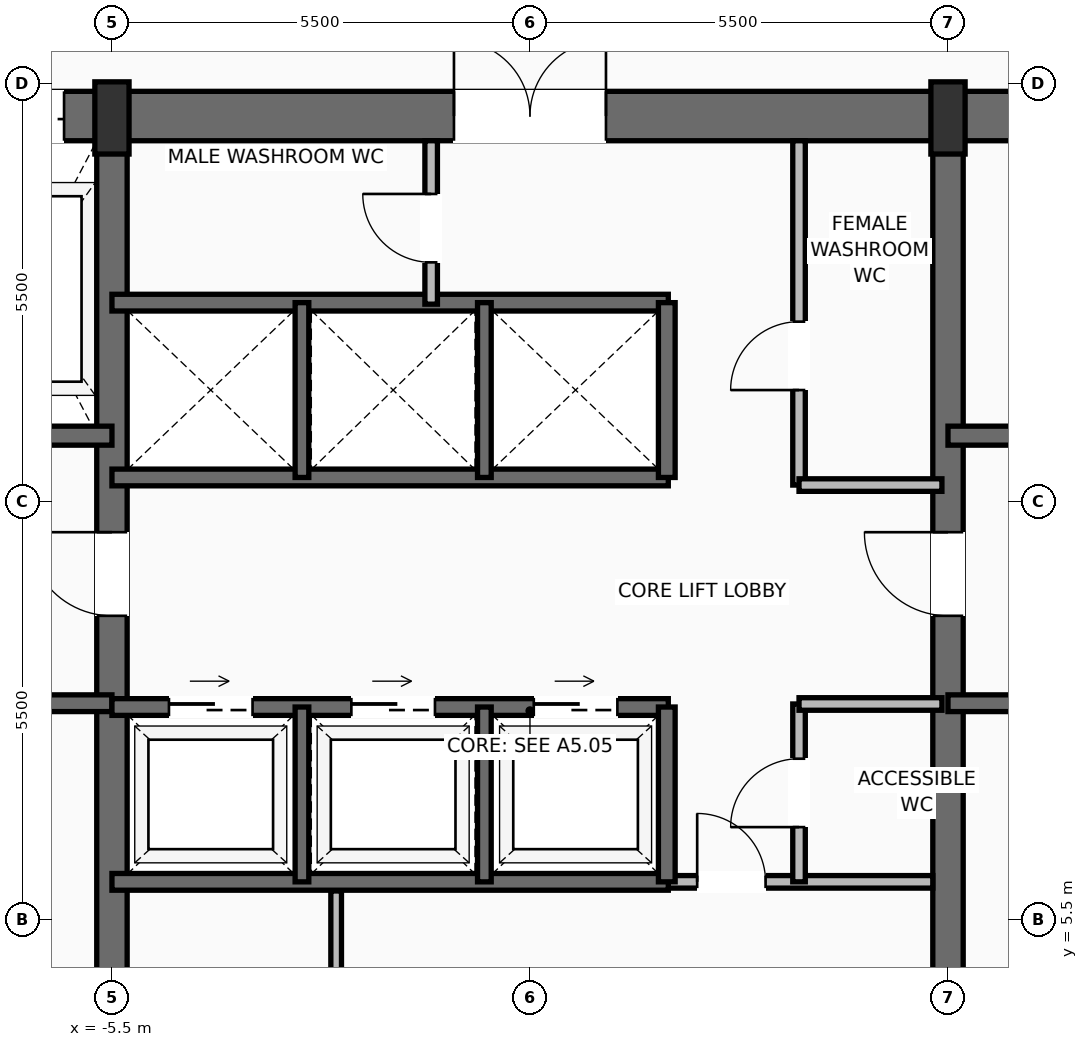
"""IFC4 building model, lengths in metres.
Left out: names, types, materials, properties, quantities, classifications, styles, units other than length and angle.
Written with IfcOpenShell. Run it as: python <this file> out.ifc"""

import sys

from ifc_helpers import new_model, si_unit, direction, frame, frame_2d, origin, origin_2d, place, context, subcontext, project, spatial, rectangle, extrude, source, transform, mapped, element, fill, save


model = new_model("IFC4")
c1 = context("Model", 3, precision=1e-05, world=origin(), true_north=direction((0.0, 1.0)))
c2 = subcontext(c1, "Body", "Model", "MODEL_VIEW")
j1 = project(units=[si_unit("LENGTHUNIT", "METRE"), si_unit("PLANEANGLEUNIT", "RADIAN")], contexts=[c1])
p1 = place(None, origin())
s1 = spatial("IfcSite", under=j1, at=p1, CompositionType="ELEMENT")
p2 = place(p1, origin())
s2 = spatial("IfcBuilding", under=s1, at=p2, CompositionType="ELEMENT")
p3 = place(p2, frame((0.0, 0.0, 144.1)))
s3 = spatial("IfcBuildingStorey", under=s2, at=p3, CompositionType="ELEMENT", Elevation=144.1)
p4 = place(p3, frame((-10.8, 16.075, 0.0), z_axis=(0.0, 0.0, 1.0), x_axis=(1.0, 0.0, 0.0)))
e1 = element("IfcWall", 1, at=p4, inside=s3, PredefinedType="SHEAR", context=c2, shape_type="SweptSolid", body=[
    extrude(rectangle(XDim=21.6, YDim=0.65, at=frame_2d((10.8, 0.0))), origin(), (0.0, 0.0, 1.0), 3.47),
])
p5 = place(p4, frame((3.37, 0.0, 0.0)))
e2 = element("IfcOpeningElement", 2, at=p5, cuts=e1, PredefinedType="OPENING", context=c2, shape_type="SweptSolid", body=[
    extrude(rectangle(XDim=1.3, YDim=2.3, at=frame_2d((0.65, 1.15))), frame((0.0, 0.335, 0.0), z_axis=(0.0, -1.0, 0.0), x_axis=(1.0, 0.0, 0.0)), (0.0, 0.0, 1.0), 0.67),
])
p6 = place(p4, frame((9.8, 0.0, 0.0)))
e3 = element("IfcOpeningElement", 3, at=p6, cuts=e1, PredefinedType="OPENING", context=c2, shape_type="SweptSolid", body=[
    extrude(rectangle(XDim=2.0, YDim=2.4, at=frame_2d((1.0, 1.2))), frame((0.0, 0.335, 0.0), z_axis=(0.0, -1.0, 0.0), x_axis=(1.0, 0.0, 0.0)), (0.0, 0.0, 1.0), 0.67),
])
p7 = place(p3, frame((-5.5, 0.525, 0.0), z_axis=(0.0, 0.0, 1.0), x_axis=(0.0, 1.0, 0.0)))
e4 = element("IfcWall", 4, at=p7, inside=s3, PredefinedType="SHEAR", context=c2, shape_type="SweptSolid", body=[
    extrude(rectangle(XDim=15.55, YDim=0.4, at=frame_2d((7.775, 0.0))), origin(), (0.0, 0.0, 1.0), 3.47),
])
p8 = place(p7, frame((8.975, 0.0, 0.0)))
e5 = element("IfcOpeningElement", 5, at=p8, cuts=e4, PredefinedType="OPENING", context=c2, shape_type="SweptSolid", body=[
    extrude(rectangle(XDim=1.1, YDim=2.2, at=frame_2d((0.55, 1.1))), frame((0.0, 0.21, 0.0), z_axis=(0.0, -1.0, 0.0), x_axis=(1.0, 0.0, 0.0)), (0.0, 0.0, 1.0), 0.42),
])
p9 = place(p3, frame((5.5, 0.525, 0.0), z_axis=(0.0, 0.0, 1.0), x_axis=(0.0, 1.0, 0.0)))
e6 = element("IfcWall", 6, at=p9, inside=s3, PredefinedType="SHEAR", context=c2, shape_type="SweptSolid", body=[
    extrude(rectangle(XDim=15.55, YDim=0.4, at=frame_2d((7.775, 0.0))), origin(), (0.0, 0.0, 1.0), 3.47),
])
p10 = place(p9, frame((8.975, 0.0, 0.0)))
e7 = element("IfcOpeningElement", 7, at=p10, cuts=e6, PredefinedType="OPENING", context=c2, shape_type="SweptSolid", body=[
    extrude(rectangle(XDim=1.1, YDim=2.2, at=frame_2d((0.55, 1.1))), frame((0.0, 0.21, 0.0), z_axis=(0.0, -1.0, 0.0), x_axis=(1.0, 0.0, 0.0)), (0.0, 0.0, 1.0), 0.42),
])
m1 = source(origin(), c2, "Body", "SweptSolid", [
    extrude(rectangle(XDim=0.45, YDim=0.95, at=origin_2d()), origin(), (0.0, 0.0, 1.0), 3.7),
])
for number, where, z_axis, x_axis in (
    (8, (-5.5, 16.05, 0.0), (0.0, 0.0, 1.0), (1.0, 0.0, 0.0)),
    (9, (5.5, 16.05, 0.0), (0.0, 0.0, 1.0), (1.0, 0.0, 0.0)),
):
    element("IfcColumn", number, at=place(p3, frame(where, z_axis=z_axis, x_axis=x_axis)), inside=s3, PredefinedType="PILASTER", context=c2, shape_type="MappedRepresentation", body=[
        mapped(m1, transform((0.0, 0.0, 0.0), scale=1.0)),
    ])
p11 = place(p3, frame((-5.5, 8.35, 0.0), z_axis=(0.0, 0.0, 1.0), x_axis=(-1.0, 0.0, 0.0)))
e10 = element("IfcWall", 10, at=p11, inside=s3, PredefinedType="SOLIDWALL", context=c2, shape_type="SweptSolid", body=[
    extrude(rectangle(XDim=4.65, YDim=0.22, at=frame_2d((2.325, 0.0))), origin(), (0.0, 0.0, 1.0), 3.47),
])
p12 = place(p11, frame((2.5, 0.0, 0.0)))
e11 = element("IfcOpeningElement", 11, at=p12, cuts=e10, PredefinedType="OPENING", context=c2, shape_type="SweptSolid", body=[
    extrude(rectangle(XDim=1.15, YDim=2.2, at=frame_2d((0.575, 1.1))), frame((0.0, 0.12, 0.0), z_axis=(0.0, -1.0, 0.0), x_axis=(1.0, 0.0, 0.0)), (0.0, 0.0, 1.0), 0.24),
])
p13 = place(p3, frame((-5.5, 11.87, 0.0), z_axis=(0.0, 0.0, 1.0), x_axis=(-1.0, 0.0, 0.0)))
e12 = element("IfcWall", 12, at=p13, inside=s3, PredefinedType="SOLIDWALL", context=c2, shape_type="SweptSolid", body=[
    extrude(rectangle(XDim=4.65, YDim=0.25, at=frame_2d((2.325, 0.0))), origin(), (0.0, 0.0, 1.0), 3.47),
])
p14 = place(p13, frame((2.95, 0.0, 0.0)))
e13 = element("IfcOpeningElement", 13, at=p14, cuts=e12, PredefinedType="OPENING", context=c2, shape_type="SweptSolid", body=[
    extrude(rectangle(XDim=1.2, YDim=2.25, at=frame_2d((0.6, 1.125))), frame((0.0, 0.135, 0.0), z_axis=(0.0, -1.0, 0.0), x_axis=(1.0, 0.0, 0.0)), (0.0, 0.0, 1.0), 0.27),
])
p15 = place(p3, frame((10.15, 8.35, 0.0), z_axis=(0.0, 0.0, 1.0), x_axis=(-1.0, 0.0, 0.0)))
e14 = element("IfcWall", 14, at=p15, inside=s3, PredefinedType="SOLIDWALL", context=c2, shape_type="SweptSolid", body=[
    extrude(rectangle(XDim=4.65, YDim=0.22, at=frame_2d((2.325, 0.0))), origin(), (0.0, 0.0, 1.0), 3.47),
])
p16 = place(p15, frame((1.0, 0.0, 0.0)))
e15 = element("IfcOpeningElement", 15, at=p16, cuts=e14, PredefinedType="OPENING", context=c2, shape_type="SweptSolid", body=[
    extrude(rectangle(XDim=1.15, YDim=2.2, at=frame_2d((0.575, 1.1))), frame((0.0, 0.12, 0.0), z_axis=(0.0, -1.0, 0.0), x_axis=(1.0, 0.0, 0.0)), (0.0, 0.0, 1.0), 0.24),
])
p17 = place(p3, frame((10.15, 11.87, 0.0), z_axis=(0.0, 0.0, 1.0), x_axis=(-1.0, 0.0, 0.0)))
e16 = element("IfcWall", 16, at=p17, inside=s3, PredefinedType="SOLIDWALL", context=c2, shape_type="SweptSolid", body=[
    extrude(rectangle(XDim=4.65, YDim=0.25, at=frame_2d((2.325, 0.0))), origin(), (0.0, 0.0, 1.0), 3.47),
])
p18 = place(p17, frame((0.5, 0.0, 0.0)))
e17 = element("IfcOpeningElement", 17, at=p18, cuts=e16, PredefinedType="OPENING", context=c2, shape_type="SweptSolid", body=[
    extrude(rectangle(XDim=1.2, YDim=2.25, at=frame_2d((0.6, 1.125))), frame((0.0, 0.135, 0.0), z_axis=(0.0, -1.0, 0.0), x_axis=(1.0, 0.0, 0.0)), (0.0, 0.0, 1.0), 0.27),
])
p19 = place(p3, frame((1.82, 6.0, 0.0), z_axis=(0.0, 0.0, 1.0), x_axis=(1.0, 0.0, 0.0)))
e18 = element("IfcWall", 18, at=p19, inside=s3, PredefinedType="PARTITIONING", context=c2, shape_type="SweptSolid", body=[
    extrude(rectangle(XDim=3.48, YDim=0.165, at=frame_2d((1.74, 0.0))), origin(), (0.0, 0.0, 1.0), 3.462),
])
p20 = place(p19, frame((0.38, 0.0, 0.0)))
e19 = element("IfcOpeningElement", 19, at=p20, cuts=e18, PredefinedType="OPENING", context=c2, shape_type="SweptSolid", body=[
    extrude(rectangle(XDim=0.9, YDim=2.1, at=frame_2d((0.45, 1.05))), frame((0.0, 0.093, 0.0), z_axis=(0.0, -1.0, 0.0), x_axis=(1.0, 0.0, 0.0)), (0.0, 0.0, 1.0), 0.185),
])
p21 = place(p3, frame((-2.55, 0.85, 0.0), z_axis=(0.0, 0.0, 1.0), x_axis=(0.0, 1.0, 0.0)))
e20 = element("IfcWall", 20, at=p21, inside=s3, PredefinedType="PARTITIONING", context=c2, shape_type="SweptSolid", body=[
    extrude(rectangle(XDim=5.03, YDim=0.14, at=frame_2d((2.515, 0.0))), origin(), (0.0, 0.0, 1.0), 3.462),
])
p22 = place(p21, frame((2.1, 0.0, 0.0)))
e21 = element("IfcOpeningElement", 21, at=p22, cuts=e20, PredefinedType="OPENING", context=c2, shape_type="SweptSolid", body=[
    extrude(rectangle(XDim=0.9, YDim=2.1, at=frame_2d((0.45, 1.05))), frame((0.0, 0.08, 0.0), z_axis=(0.0, -1.0, 0.0), x_axis=(1.0, 0.0, 0.0)), (0.0, 0.0, 1.0), 0.16),
])
p23 = place(p3, frame((3.54, 6.0, 0.0), z_axis=(0.0, 0.0, 1.0), x_axis=(0.0, 1.0, 0.0)))
e22 = element("IfcWall", 22, at=p23, inside=s3, PredefinedType="PARTITIONING", context=c2, shape_type="SweptSolid", body=[
    extrude(rectangle(XDim=2.34, YDim=0.165, at=frame_2d((1.17, 0.0))), origin(), (0.0, 0.0, 1.0), 3.462),
])
p24 = place(p23, frame((0.72, 0.0, 0.0)))
e23 = element("IfcOpeningElement", 23, at=p24, cuts=e22, PredefinedType="OPENING", context=c2, shape_type="SweptSolid", body=[
    extrude(rectangle(XDim=0.9, YDim=2.1, at=frame_2d((0.45, 1.05))), frame((0.0, 0.093, 0.0), z_axis=(0.0, -1.0, 0.0), x_axis=(1.0, 0.0, 0.0)), (0.0, 0.0, 1.0), 0.185),
])
p25 = place(p3, frame((3.54, 8.34, 0.0), z_axis=(0.0, 0.0, 1.0), x_axis=(1.0, 0.0, 0.0)))
e24 = element("IfcWall", 24, at=p25, inside=s3, PredefinedType="PARTITIONING", context=c2, shape_type="SweptSolid", body=[
    extrude(rectangle(XDim=1.88, YDim=0.165, at=frame_2d((0.94, 0.0))), origin(), (0.0, 0.0, 1.0), 3.462),
])
p26 = place(p3, frame((-5.5, 6.0, 0.0), z_axis=(0.0, 0.0, 1.0), x_axis=(1.0, 0.0, 0.0)))
e25 = element("IfcWall", 25, at=p26, inside=s3, PredefinedType="SOLIDWALL", context=c2, shape_type="SweptSolid", body=[
    extrude(rectangle(XDim=7.32, YDim=0.22, at=frame_2d((3.66, 0.0))), origin(), (0.0, 0.0, 1.0), 3.47),
])
p27 = place(p3, frame((-5.5, 8.3, 0.0), z_axis=(0.0, 0.0, 1.0), x_axis=(1.0, 0.0, 0.0)))
e26 = element("IfcWall", 26, at=p27, inside=s3, PredefinedType="SOLIDWALL", context=c2, shape_type="SweptSolid", body=[
    extrude(rectangle(XDim=7.32, YDim=0.22, at=frame_2d((3.66, 0.0))), origin(), (0.0, 0.0, 1.0), 3.47),
])
p28 = place(p27, frame((0.75, 0.0, 0.0)))
e27 = element("IfcOpeningElement", 27, at=p28, cuts=e26, PredefinedType="OPENING", context=c2, shape_type="SweptSolid", body=[
    extrude(rectangle(XDim=1.1, YDim=2.2, at=frame_2d((0.55, 1.1))), frame((0.0, 0.12, 0.0), z_axis=(0.0, -1.0, 0.0), x_axis=(1.0, 0.0, 0.0)), (0.0, 0.0, 1.0), 0.24),
])
p29 = place(p27, frame((3.15, 0.0, 0.0)))
e28 = element("IfcOpeningElement", 28, at=p29, cuts=e26, PredefinedType="OPENING", context=c2, shape_type="SweptSolid", body=[
    extrude(rectangle(XDim=1.1, YDim=2.2, at=frame_2d((0.55, 1.1))), frame((0.0, 0.12, 0.0), z_axis=(0.0, -1.0, 0.0), x_axis=(1.0, 0.0, 0.0)), (0.0, 0.0, 1.0), 0.24),
])
p30 = place(p27, frame((5.55, 0.0, 0.0)))
e29 = element("IfcOpeningElement", 29, at=p30, cuts=e26, PredefinedType="OPENING", context=c2, shape_type="SweptSolid", body=[
    extrude(rectangle(XDim=1.1, YDim=2.2, at=frame_2d((0.55, 1.1))), frame((0.0, 0.12, 0.0), z_axis=(0.0, -1.0, 0.0), x_axis=(1.0, 0.0, 0.0)), (0.0, 0.0, 1.0), 0.24),
])
p31 = place(p3, frame((1.8, 6.0, 0.0), z_axis=(0.0, 0.0, 1.0), x_axis=(0.0, 1.0, 0.0)))
e30 = element("IfcWall", 30, at=p31, inside=s3, PredefinedType="SOLIDWALL", context=c2, shape_type="SweptSolid", body=[
    extrude(rectangle(XDim=2.3, YDim=0.22, at=frame_2d((1.15, 0.0))), origin(), (0.0, 0.0, 1.0), 3.47),
])
for number, where, z_axis, x_axis in (
    (31, (-3.0, 6.0, 0.0), (0.0, 0.0, 1.0), (0.0, 1.0, 0.0)),
    (32, (-0.6, 6.0, 0.0), (0.0, 0.0, 1.0), (0.0, 1.0, 0.0)),
):
    element("IfcWall", number, at=place(p3, frame(where, z_axis=z_axis, x_axis=x_axis)), inside=s3, PredefinedType="SOLIDWALL", context=c2, shape_type="SweptSolid", body=[
        extrude(rectangle(XDim=2.3, YDim=0.18, at=frame_2d((1.15, 0.0))), origin(), (0.0, 0.0, 1.0), 3.47),
    ])
for number, where, z_axis, x_axis in (
    (33, (-5.5, 11.32, 0.0), (0.0, 0.0, 1.0), (1.0, 0.0, 0.0)),
    (34, (-5.5, 13.62, 0.0), (0.0, 0.0, 1.0), (1.0, 0.0, 0.0)),
):
    element("IfcWall", number, at=place(p3, frame(where, z_axis=z_axis, x_axis=x_axis)), inside=s3, PredefinedType="SOLIDWALL", context=c2, shape_type="SweptSolid", body=[
        extrude(rectangle(XDim=7.32, YDim=0.22, at=frame_2d((3.66, 0.0))), origin(), (0.0, 0.0, 1.0), 3.47),
    ])
p32 = place(p3, frame((1.8, 11.32, 0.0), z_axis=(0.0, 0.0, 1.0), x_axis=(0.0, 1.0, 0.0)))
e35 = element("IfcWall", 35, at=p32, inside=s3, PredefinedType="SOLIDWALL", context=c2, shape_type="SweptSolid", body=[
    extrude(rectangle(XDim=2.3, YDim=0.22, at=frame_2d((1.15, 0.0))), origin(), (0.0, 0.0, 1.0), 3.47),
])
for number, where, z_axis, x_axis in (
    (36, (-3.0, 11.32, 0.0), (0.0, 0.0, 1.0), (0.0, 1.0, 0.0)),
    (37, (-0.6, 11.32, 0.0), (0.0, 0.0, 1.0), (0.0, 1.0, 0.0)),
):
    element("IfcWall", number, at=place(p3, frame(where, z_axis=z_axis, x_axis=x_axis)), inside=s3, PredefinedType="SOLIDWALL", context=c2, shape_type="SweptSolid", body=[
        extrude(rectangle(XDim=2.3, YDim=0.18, at=frame_2d((1.15, 0.0))), origin(), (0.0, 0.0, 1.0), 3.47),
    ])
p33 = place(p3, frame((-1.3, 13.6, 0.0), z_axis=(0.0, 0.0, 1.0), x_axis=(0.0, 1.0, 0.0)))
e38 = element("IfcWall", 38, at=p33, inside=s3, PredefinedType="PARTITIONING", context=c2, shape_type="SweptSolid", body=[
    extrude(rectangle(XDim=2.15, YDim=0.165, at=frame_2d((1.075, 0.0))), origin(), (0.0, 0.0, 1.0), 3.462),
])
p34 = place(p33, frame((0.55, 0.0, 0.0)))
e39 = element("IfcOpeningElement", 39, at=p34, cuts=e38, PredefinedType="OPENING", context=c2, shape_type="SweptSolid", body=[
    extrude(rectangle(XDim=0.9, YDim=2.1, at=frame_2d((0.45, 1.05))), frame((0.0, 0.093, 0.0), z_axis=(0.0, -1.0, 0.0), x_axis=(1.0, 0.0, 0.0)), (0.0, 0.0, 1.0), 0.185),
])
p35 = place(p3, frame((3.54, 11.22, 0.0), z_axis=(0.0, 0.0, 1.0), x_axis=(0.0, 1.0, 0.0)))
e40 = element("IfcWall", 40, at=p35, inside=s3, PredefinedType="PARTITIONING", context=c2, shape_type="SweptSolid", body=[
    extrude(rectangle(XDim=4.53, YDim=0.165, at=frame_2d((2.265, 0.0))), origin(), (0.0, 0.0, 1.0), 3.462),
])
p36 = place(p35, frame((1.25, 0.0, 0.0)))
e41 = element("IfcOpeningElement", 41, at=p36, cuts=e40, PredefinedType="OPENING", context=c2, shape_type="SweptSolid", body=[
    extrude(rectangle(XDim=0.9, YDim=2.1, at=frame_2d((0.45, 1.05))), frame((0.0, 0.093, 0.0), z_axis=(0.0, -1.0, 0.0), x_axis=(1.0, 0.0, 0.0)), (0.0, 0.0, 1.0), 0.185),
])
p37 = place(p3, frame((3.54, 11.22, 0.0), z_axis=(0.0, 0.0, 1.0), x_axis=(1.0, 0.0, 0.0)))
e42 = element("IfcWall", 42, at=p37, inside=s3, PredefinedType="PARTITIONING", context=c2, shape_type="SweptSolid", body=[
    extrude(rectangle(XDim=1.88, YDim=0.165, at=frame_2d((0.94, 0.0))), origin(), (0.0, 0.0, 1.0), 3.462),
])
m2 = source(origin(), c2, "Body", "SweptSolid", [
    extrude(rectangle(XDim=1.1, YDim=2.2, at=frame_2d((0.55, 1.1))), frame((0.0, 0.025, 0.0), z_axis=(0.0, -1.0, 0.0), x_axis=(1.0, 0.0, 0.0)), (0.0, 0.0, 1.0), 0.05),
])
p38 = place(p8, origin())
e43 = element("IfcDoor", 43, at=p38, inside=s3, OperationType="SINGLE_SWING_RIGHT", PredefinedType="DOOR", context=c2, shape_type="MappedRepresentation", body=[
    mapped(m2, transform((0.0, 0.0, 0.0), scale=1.0)),
])
fill(e5, e43)
m3 = source(origin(), c2, "Body", "SweptSolid", [
    extrude(rectangle(XDim=1.3, YDim=2.3, at=frame_2d((0.65, 1.15))), frame((0.0, 0.025, 0.0), z_axis=(0.0, -1.0, 0.0), x_axis=(1.0, 0.0, 0.0)), (0.0, 0.0, 1.0), 0.05),
])
p39 = place(p5, origin())
e44 = element("IfcDoor", 44, at=p39, inside=s3, OperationType="SLIDING_TO_RIGHT", PredefinedType="DOOR", context=c2, shape_type="MappedRepresentation", body=[
    mapped(m3, transform((0.0, 0.0, 0.0), scale=1.0)),
])
fill(e2, e44)
p40 = place(p10, origin())
e45 = element("IfcDoor", 45, at=p40, inside=s3, OperationType="SINGLE_SWING_RIGHT", PredefinedType="DOOR", context=c2, shape_type="MappedRepresentation", body=[
    mapped(m2, transform((0.0, 0.0, 0.0), scale=1.0)),
])
fill(e7, e45)
m4 = source(origin(), c2, "Body", "SweptSolid", [
    extrude(rectangle(XDim=2.0, YDim=2.4, at=frame_2d((1.0, 1.2))), frame((0.0, 0.025, 0.0), z_axis=(0.0, -1.0, 0.0), x_axis=(1.0, 0.0, 0.0)), (0.0, 0.0, 1.0), 0.05),
])
p41 = place(p6, origin())
e46 = element("IfcDoor", 46, at=p41, inside=s3, OperationType="DOUBLE_DOOR_SINGLE_SWING", PredefinedType="DOOR", context=c2, shape_type="MappedRepresentation", body=[
    mapped(m4, transform((0.0, 0.0, 0.0), scale=1.0)),
])
fill(e3, e46)
m5 = source(origin(), c2, "Body", "SweptSolid", [
    extrude(rectangle(XDim=0.9, YDim=2.1, at=frame_2d((0.45, 1.05))), frame((0.0, 0.025, 0.0), z_axis=(0.0, -1.0, 0.0), x_axis=(1.0, 0.0, 0.0)), (0.0, 0.0, 1.0), 0.05),
])
p42 = place(p20, origin())
e47 = element("IfcDoor", 47, at=p42, inside=s3, OperationType="SINGLE_SWING_LEFT", PredefinedType="DOOR", context=c2, shape_type="MappedRepresentation", body=[
    mapped(m5, transform((0.0, 0.0, 0.0), scale=1.0)),
])
fill(e19, e47)
p43 = place(p24, origin())
e48 = element("IfcDoor", 48, at=p43, inside=s3, OperationType="SINGLE_SWING_LEFT", PredefinedType="DOOR", context=c2, shape_type="MappedRepresentation", body=[
    mapped(m5, transform((0.0, 0.0, 0.0), scale=1.0)),
])
fill(e23, e48)
m6 = source(origin(), c2, "Body", "SweptSolid", [
    extrude(rectangle(XDim=1.1, YDim=2.2, at=frame_2d((0.55, 1.1))), frame((0.0, 0.025, 0.0), z_axis=(0.0, -1.0, 0.0), x_axis=(1.0, 0.0, 0.0)), (0.0, 0.0, 1.0), 0.05),
])
p44 = place(p28, origin())
e49 = element("IfcDoor", 49, at=p44, inside=s3, OperationType="SLIDING_TO_LEFT", PredefinedType="DOOR", context=c2, shape_type="MappedRepresentation", body=[
    mapped(m6, transform((0.0, 0.0, 0.0), scale=1.0)),
])
fill(e27, e49)
p45 = place(p29, origin())
e50 = element("IfcDoor", 50, at=p45, inside=s3, OperationType="SLIDING_TO_LEFT", PredefinedType="DOOR", context=c2, shape_type="MappedRepresentation", body=[
    mapped(m6, transform((0.0, 0.0, 0.0), scale=1.0)),
])
fill(e28, e50)
p46 = place(p30, origin())
e51 = element("IfcDoor", 51, at=p46, inside=s3, OperationType="SLIDING_TO_LEFT", PredefinedType="DOOR", context=c2, shape_type="MappedRepresentation", body=[
    mapped(m6, transform((0.0, 0.0, 0.0), scale=1.0)),
])
fill(e29, e51)
p47 = place(p34, origin())
e52 = element("IfcDoor", 52, at=p47, inside=s3, OperationType="SINGLE_SWING_RIGHT", PredefinedType="DOOR", context=c2, shape_type="MappedRepresentation", body=[
    mapped(m5, transform((0.0, 0.0, 0.0), scale=1.0)),
])
fill(e39, e52)
p48 = place(p36, origin())
e53 = element("IfcDoor", 53, at=p48, inside=s3, OperationType="SINGLE_SWING_LEFT", PredefinedType="DOOR", context=c2, shape_type="MappedRepresentation", body=[
    mapped(m5, transform((0.0, 0.0, 0.0), scale=1.0)),
])
fill(e41, e53)
save(model, sys.argv[1])
